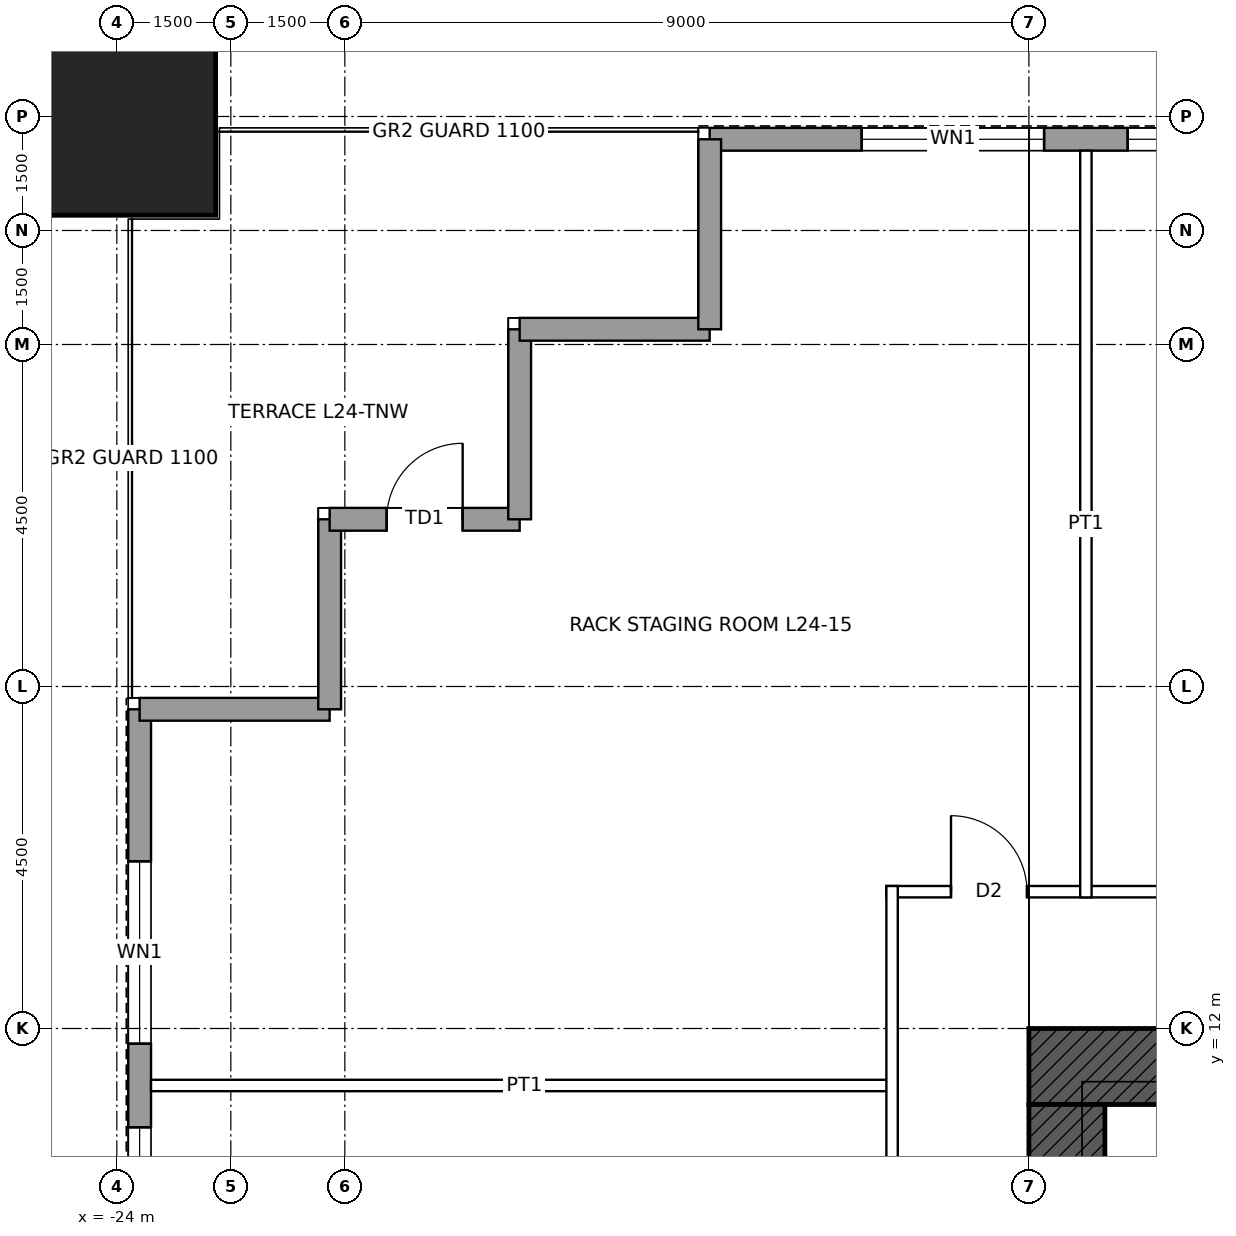
"""IFC4 building model, lengths in metres.
Left out: names, types, materials, properties, quantities, classifications, styles, units other than length and angle.
Written with IfcOpenShell. Run it as: python <this file> out.ifc"""

import sys

from ifc_helpers import new_model, si_unit, direction, frame, frame_2d, origin, origin_2d, place, context, subcontext, project, spatial, rectangle, hollow_rectangle, extrude, element, fill, save


model = new_model("IFC4")
c1 = context("Model", 3, precision=1e-05, world=origin(), true_north=direction((0.0, 1.0)))
c2 = subcontext(c1, "Body", "Model", "MODEL_VIEW")
j1 = project(units=[si_unit("LENGTHUNIT", "METRE"), si_unit("PLANEANGLEUNIT", "RADIAN")], contexts=[c1])
p1 = place(None, origin())
s1 = spatial("IfcSite", under=j1, at=p1, CompositionType="ELEMENT")
p2 = place(p1, origin())
s2 = spatial("IfcBuilding", under=s1, at=p2, CompositionType="ELEMENT")
p3 = place(p2, frame((0.0, 0.0, 122.4)))
s3 = spatial("IfcBuildingStorey", under=s2, at=p3, CompositionType="ELEMENT", Elevation=122.4)
p4 = place(p3, frame((-24.0, 24.0, 0.0), z_axis=(0.0, 0.0, 1.0), x_axis=(1.0, 0.0, 0.0)))
e1 = element("IfcColumn", 1, at=p4, inside=s3, PredefinedType="COLUMN", context=c2, shape_type="SweptSolid", body=[
    extrude(hollow_rectangle(XDim=2.6, YDim=2.6, WallThickness=0.13, at=origin_2d()), origin(), (0.0, 0.0, 1.0), 4.5),
])
p5 = place(p3, frame((-12.0, 11.5, 0.0), z_axis=(0.0, 0.0, 1.0), x_axis=(1.0, 0.0, 0.0)))
e2 = element("IfcWall", 2, at=p5, inside=s3, PredefinedType="SHEAR", context=c2, shape_type="SweptSolid", body=[
    extrude(rectangle(XDim=24.0, YDim=1.0, at=frame_2d((12.0, 0.0))), origin(), (0.0, 0.0, 1.0), 4.5),
])
p6 = place(p5, frame((6.25, 0.0, 0.0)))
e3 = element("IfcOpeningElement", 3, at=p6, cuts=e2, PredefinedType="OPENING", context=c2, shape_type="SweptSolid", body=[
    extrude(rectangle(XDim=1.0, YDim=2.4, at=frame_2d((0.5, 1.2))), frame((0.0, 0.51, 0.0), z_axis=(0.0, -1.0, 0.0), x_axis=(1.0, 0.0, 0.0)), (0.0, 0.0, 1.0), 1.02),
])
p7 = place(p5, frame((16.75, 0.0, 0.0)))
e4 = element("IfcOpeningElement", 4, at=p7, cuts=e2, PredefinedType="OPENING", context=c2, shape_type="SweptSolid", body=[
    extrude(rectangle(XDim=1.0, YDim=2.4, at=frame_2d((0.5, 1.2))), frame((0.0, 0.51, 0.0), z_axis=(0.0, -1.0, 0.0), x_axis=(1.0, 0.0, 0.0)), (0.0, 0.0, 1.0), 1.02),
])
p8 = place(p3, frame((-11.5, -11.0, 0.0), z_axis=(0.0, 0.0, 1.0), x_axis=(0.0, 1.0, 0.0)))
e5 = element("IfcWall", 5, at=p8, inside=s3, PredefinedType="SHEAR", context=c2, shape_type="SweptSolid", body=[
    extrude(rectangle(XDim=22.0, YDim=1.0, at=frame_2d((11.0, 0.0))), origin(), (0.0, 0.0, 1.0), 4.5),
])
p9 = place(p8, frame((10.5, 0.0, 0.0)))
e6 = element("IfcOpeningElement", 6, at=p9, cuts=e5, PredefinedType="OPENING", context=c2, shape_type="SweptSolid", body=[
    extrude(rectangle(XDim=1.0, YDim=2.4, at=frame_2d((0.5, 1.2))), frame((0.0, 0.51, 0.0), z_axis=(0.0, -1.0, 0.0), x_axis=(1.0, 0.0, 0.0)), (0.0, 0.0, 1.0), 1.02),
])
p10 = place(p3, frame((-16.2, 23.7, 0.0), z_axis=(0.0, 0.0, 1.0), x_axis=(1.0, 0.0, 0.0)))
e7 = element("IfcWall", 7, at=p10, inside=s3, PredefinedType="SOLIDWALL", context=c2, shape_type="SweptSolid", body=[
    extrude(rectangle(XDim=32.4, YDim=0.3, at=frame_2d((16.2, 0.0))), origin(), (0.0, 0.0, 1.0), 4.3),
])
p11 = place(p10, frame((2.0, 0.0, 1.0)))
e8 = element("IfcOpeningElement", 8, at=p11, cuts=e7, PredefinedType="OPENING", context=c2, shape_type="SweptSolid", body=[
    extrude(rectangle(XDim=2.4, YDim=1.2, at=frame_2d((1.2, 0.6))), frame((0.0, 0.16, 0.0), z_axis=(0.0, -1.0, 0.0), x_axis=(1.0, 0.0, 0.0)), (0.0, 0.0, 1.0), 0.32),
])
p12 = place(p10, frame((5.5, 0.0, 1.0)))
e9 = element("IfcOpeningElement", 9, at=p12, cuts=e7, PredefinedType="OPENING", context=c2, shape_type="SweptSolid", body=[
    extrude(rectangle(XDim=2.4, YDim=1.2, at=frame_2d((1.2, 0.6))), frame((0.0, 0.16, 0.0), z_axis=(0.0, -1.0, 0.0), x_axis=(1.0, 0.0, 0.0)), (0.0, 0.0, 1.0), 0.32),
])
p13 = place(p10, frame((8.6, 0.0, 1.0)))
e10 = element("IfcOpeningElement", 10, at=p13, cuts=e7, PredefinedType="OPENING", context=c2, shape_type="SweptSolid", body=[
    extrude(rectangle(XDim=2.4, YDim=1.2, at=frame_2d((1.2, 0.6))), frame((0.0, 0.16, 0.0), z_axis=(0.0, -1.0, 0.0), x_axis=(1.0, 0.0, 0.0)), (0.0, 0.0, 1.0), 0.32),
])
p14 = place(p10, frame((13.65, 0.0, 1.0)))
e11 = element("IfcOpeningElement", 11, at=p14, cuts=e7, PredefinedType="OPENING", context=c2, shape_type="SweptSolid", body=[
    extrude(rectangle(XDim=2.4, YDim=1.2, at=frame_2d((1.2, 0.6))), frame((0.0, 0.16, 0.0), z_axis=(0.0, -1.0, 0.0), x_axis=(1.0, 0.0, 0.0)), (0.0, 0.0, 1.0), 0.32),
])
p15 = place(p10, frame((16.35, 0.0, 1.0)))
e12 = element("IfcOpeningElement", 12, at=p15, cuts=e7, PredefinedType="OPENING", context=c2, shape_type="SweptSolid", body=[
    extrude(rectangle(XDim=2.4, YDim=1.2, at=frame_2d((1.2, 0.6))), frame((0.0, 0.16, 0.0), z_axis=(0.0, -1.0, 0.0), x_axis=(1.0, 0.0, 0.0)), (0.0, 0.0, 1.0), 0.32),
])
p16 = place(p10, frame((21.4, 0.0, 1.0)))
e13 = element("IfcOpeningElement", 13, at=p16, cuts=e7, PredefinedType="OPENING", context=c2, shape_type="SweptSolid", body=[
    extrude(rectangle(XDim=2.4, YDim=1.2, at=frame_2d((1.2, 0.6))), frame((0.0, 0.16, 0.0), z_axis=(0.0, -1.0, 0.0), x_axis=(1.0, 0.0, 0.0)), (0.0, 0.0, 1.0), 0.32),
])
p17 = place(p10, frame((24.5, 0.0, 1.0)))
e14 = element("IfcOpeningElement", 14, at=p17, cuts=e7, PredefinedType="OPENING", context=c2, shape_type="SweptSolid", body=[
    extrude(rectangle(XDim=2.4, YDim=1.2, at=frame_2d((1.2, 0.6))), frame((0.0, 0.16, 0.0), z_axis=(0.0, -1.0, 0.0), x_axis=(1.0, 0.0, 0.0)), (0.0, 0.0, 1.0), 0.32),
])
p18 = place(p10, frame((28.0, 0.0, 1.0)))
e15 = element("IfcOpeningElement", 15, at=p18, cuts=e7, PredefinedType="OPENING", context=c2, shape_type="SweptSolid", body=[
    extrude(rectangle(XDim=2.4, YDim=1.2, at=frame_2d((1.2, 0.6))), frame((0.0, 0.16, 0.0), z_axis=(0.0, -1.0, 0.0), x_axis=(1.0, 0.0, 0.0)), (0.0, 0.0, 1.0), 0.32),
])
p19 = place(p3, frame((-23.7, -16.2, 0.0), z_axis=(0.0, 0.0, 1.0), x_axis=(0.0, 1.0, 0.0)))
e16 = element("IfcWall", 16, at=p19, inside=s3, PredefinedType="SOLIDWALL", context=c2, shape_type="SweptSolid", body=[
    extrude(rectangle(XDim=32.4, YDim=0.3, at=frame_2d((16.2, 0.0))), origin(), (0.0, 0.0, 1.0), 4.3),
])
p20 = place(p19, frame((2.0, 0.0, 1.0)))
e17 = element("IfcOpeningElement", 17, at=p20, cuts=e16, PredefinedType="OPENING", context=c2, shape_type="SweptSolid", body=[
    extrude(rectangle(XDim=2.4, YDim=1.2, at=frame_2d((1.2, 0.6))), frame((0.0, 0.16, 0.0), z_axis=(0.0, -1.0, 0.0), x_axis=(1.0, 0.0, 0.0)), (0.0, 0.0, 1.0), 0.32),
])
p21 = place(p19, frame((5.5, 0.0, 1.0)))
e18 = element("IfcOpeningElement", 18, at=p21, cuts=e16, PredefinedType="OPENING", context=c2, shape_type="SweptSolid", body=[
    extrude(rectangle(XDim=2.4, YDim=1.2, at=frame_2d((1.2, 0.6))), frame((0.0, 0.16, 0.0), z_axis=(0.0, -1.0, 0.0), x_axis=(1.0, 0.0, 0.0)), (0.0, 0.0, 1.0), 0.32),
])
p22 = place(p19, frame((8.6, 0.0, 1.0)))
e19 = element("IfcOpeningElement", 19, at=p22, cuts=e16, PredefinedType="OPENING", context=c2, shape_type="SweptSolid", body=[
    extrude(rectangle(XDim=2.4, YDim=1.2, at=frame_2d((1.2, 0.6))), frame((0.0, 0.16, 0.0), z_axis=(0.0, -1.0, 0.0), x_axis=(1.0, 0.0, 0.0)), (0.0, 0.0, 1.0), 0.32),
])
p23 = place(p19, frame((13.65, 0.0, 1.0)))
e20 = element("IfcOpeningElement", 20, at=p23, cuts=e16, PredefinedType="OPENING", context=c2, shape_type="SweptSolid", body=[
    extrude(rectangle(XDim=2.4, YDim=1.2, at=frame_2d((1.2, 0.6))), frame((0.0, 0.16, 0.0), z_axis=(0.0, -1.0, 0.0), x_axis=(1.0, 0.0, 0.0)), (0.0, 0.0, 1.0), 0.32),
])
p24 = place(p19, frame((16.35, 0.0, 1.0)))
e21 = element("IfcOpeningElement", 21, at=p24, cuts=e16, PredefinedType="OPENING", context=c2, shape_type="SweptSolid", body=[
    extrude(rectangle(XDim=2.4, YDim=1.2, at=frame_2d((1.2, 0.6))), frame((0.0, 0.16, 0.0), z_axis=(0.0, -1.0, 0.0), x_axis=(1.0, 0.0, 0.0)), (0.0, 0.0, 1.0), 0.32),
])
p25 = place(p19, frame((21.4, 0.0, 1.0)))
e22 = element("IfcOpeningElement", 22, at=p25, cuts=e16, PredefinedType="OPENING", context=c2, shape_type="SweptSolid", body=[
    extrude(rectangle(XDim=2.4, YDim=1.2, at=frame_2d((1.2, 0.6))), frame((0.0, 0.16, 0.0), z_axis=(0.0, -1.0, 0.0), x_axis=(1.0, 0.0, 0.0)), (0.0, 0.0, 1.0), 0.32),
])
p26 = place(p19, frame((24.5, 0.0, 1.0)))
e23 = element("IfcOpeningElement", 23, at=p26, cuts=e16, PredefinedType="OPENING", context=c2, shape_type="SweptSolid", body=[
    extrude(rectangle(XDim=2.4, YDim=1.2, at=frame_2d((1.2, 0.6))), frame((0.0, 0.16, 0.0), z_axis=(0.0, -1.0, 0.0), x_axis=(1.0, 0.0, 0.0)), (0.0, 0.0, 1.0), 0.32),
])
p27 = place(p19, frame((28.0, 0.0, 1.0)))
e24 = element("IfcOpeningElement", 24, at=p27, cuts=e16, PredefinedType="OPENING", context=c2, shape_type="SweptSolid", body=[
    extrude(rectangle(XDim=2.4, YDim=1.2, at=frame_2d((1.2, 0.6))), frame((0.0, 0.16, 0.0), z_axis=(0.0, -1.0, 0.0), x_axis=(1.0, 0.0, 0.0)), (0.0, 0.0, 1.0), 0.32),
])
for number, where, z_axis, x_axis in (
    (25, (-23.7, 16.2, 0.0), (0.0, 0.0, 1.0), (1.0, 0.0, 0.0)),
    (26, (-21.2, 16.2, 0.0), (0.0, 0.0, 1.0), (0.0, 1.0, 0.0)),
):
    element("IfcWall", number, at=place(p3, frame(where, z_axis=z_axis, x_axis=x_axis)), inside=s3, PredefinedType="SOLIDWALL", context=c2, shape_type="SweptSolid", body=[
        extrude(rectangle(XDim=2.5, YDim=0.3, at=frame_2d((1.25, 0.0))), origin(), (0.0, 0.0, 1.0), 4.3),
    ])
p28 = place(p3, frame((-21.2, 18.7, 0.0), z_axis=(0.0, 0.0, 1.0), x_axis=(1.0, 0.0, 0.0)))
e27 = element("IfcWall", 27, at=p28, inside=s3, PredefinedType="SOLIDWALL", context=c2, shape_type="SweptSolid", body=[
    extrude(rectangle(XDim=2.5, YDim=0.3, at=frame_2d((1.25, 0.0))), origin(), (0.0, 0.0, 1.0), 4.3),
])
p29 = place(p28, frame((0.75, 0.0, 0.0)))
e28 = element("IfcOpeningElement", 28, at=p29, cuts=e27, PredefinedType="OPENING", context=c2, shape_type="SweptSolid", body=[
    extrude(rectangle(XDim=1.0, YDim=2.4, at=frame_2d((0.5, 1.2))), frame((0.0, 0.16, 0.0), z_axis=(0.0, -1.0, 0.0), x_axis=(1.0, 0.0, 0.0)), (0.0, 0.0, 1.0), 0.32),
])
for number, where, z_axis, x_axis in (
    (29, (-18.7, 18.7, 0.0), (0.0, 0.0, 1.0), (0.0, 1.0, 0.0)),
    (30, (-18.7, 21.2, 0.0), (0.0, 0.0, 1.0), (1.0, 0.0, 0.0)),
    (31, (-16.2, 21.2, 0.0), (0.0, 0.0, 1.0), (0.0, 1.0, 0.0)),
):
    element("IfcWall", number, at=place(p3, frame(where, z_axis=z_axis, x_axis=x_axis)), inside=s3, PredefinedType="SOLIDWALL", context=c2, shape_type="SweptSolid", body=[
        extrude(rectangle(XDim=2.5, YDim=0.3, at=frame_2d((1.25, 0.0))), origin(), (0.0, 0.0, 1.0), 4.3),
    ])
p30 = place(p3, frame((-23.55, 11.25, 0.0), z_axis=(0.0, 0.0, 1.0), x_axis=(1.0, 0.0, 0.0)))
e32 = element("IfcWall", 32, at=p30, inside=s3, PredefinedType="PARTITIONING", context=c2, shape_type="SweptSolid", body=[
    extrude(rectangle(XDim=9.825, YDim=0.15, at=frame_2d((4.913, 0.0))), origin(), (0.0, 0.0, 1.0), 3.431),
])
p31 = place(p3, frame((-13.875, 13.8, 0.0), z_axis=(0.0, 0.0, 1.0), x_axis=(1.0, 0.0, 0.0)))
e33 = element("IfcWall", 33, at=p31, inside=s3, PredefinedType="PARTITIONING", context=c2, shape_type="SweptSolid", body=[
    extrude(rectangle(XDim=27.75, YDim=0.15, at=frame_2d((13.875, 0.0))), origin(), (0.0, 0.0, 1.0), 4.3),
])
p32 = place(p31, frame((5.475, 0.0, 0.0)))
e34 = element("IfcOpeningElement", 34, at=p32, cuts=e33, PredefinedType="OPENING", context=c2, shape_type="SweptSolid", body=[
    extrude(rectangle(XDim=1.8, YDim=2.4, at=frame_2d((0.9, 1.2))), frame((0.0, 0.085, 0.0), z_axis=(0.0, -1.0, 0.0), x_axis=(1.0, 0.0, 0.0)), (0.0, 0.0, 1.0), 0.17),
])
p33 = place(p31, frame((13.375, 0.0, 0.0)))
e35 = element("IfcOpeningElement", 35, at=p33, cuts=e33, PredefinedType="OPENING", context=c2, shape_type="SweptSolid", body=[
    extrude(rectangle(XDim=1.0, YDim=2.1, at=frame_2d((0.5, 1.05))), frame((0.0, 0.085, 0.0), z_axis=(0.0, -1.0, 0.0), x_axis=(1.0, 0.0, 0.0)), (0.0, 0.0, 1.0), 0.17),
])
p34 = place(p31, frame((20.475, 0.0, 0.0)))
e36 = element("IfcOpeningElement", 36, at=p34, cuts=e33, PredefinedType="OPENING", context=c2, shape_type="SweptSolid", body=[
    extrude(rectangle(XDim=1.8, YDim=2.4, at=frame_2d((0.9, 1.2))), frame((0.0, 0.085, 0.0), z_axis=(0.0, -1.0, 0.0), x_axis=(1.0, 0.0, 0.0)), (0.0, 0.0, 1.0), 0.17),
])
p35 = place(p31, frame((25.9, 0.0, 0.0)))
e37 = element("IfcOpeningElement", 37, at=p35, cuts=e33, PredefinedType="OPENING", context=c2, shape_type="SweptSolid", body=[
    extrude(rectangle(XDim=1.0, YDim=2.1, at=frame_2d((0.5, 1.05))), frame((0.0, 0.085, 0.0), z_axis=(0.0, -1.0, 0.0), x_axis=(1.0, 0.0, 0.0)), (0.0, 0.0, 1.0), 0.17),
])
p36 = place(p31, frame((0.85, 0.0, 0.0)))
e38 = element("IfcOpeningElement", 38, at=p36, cuts=e33, PredefinedType="OPENING", context=c2, shape_type="SweptSolid", body=[
    extrude(rectangle(XDim=1.0, YDim=2.1, at=frame_2d((0.5, 1.05))), frame((0.0, 0.085, 0.0), z_axis=(0.0, -1.0, 0.0), x_axis=(1.0, 0.0, 0.0)), (0.0, 0.0, 1.0), 0.17),
])
p37 = place(p3, frame((-13.8, -13.875, 0.0), z_axis=(0.0, 0.0, 1.0), x_axis=(0.0, 1.0, 0.0)))
e39 = element("IfcWall", 39, at=p37, inside=s3, PredefinedType="PARTITIONING", context=c2, shape_type="SweptSolid", body=[
    extrude(rectangle(XDim=27.75, YDim=0.15, at=frame_2d((13.875, 0.0))), origin(), (0.0, 0.0, 1.0), 4.3),
])
p38 = place(p37, frame((7.75, 0.0, 0.0)))
e40 = element("IfcOpeningElement", 40, at=p38, cuts=e39, PredefinedType="OPENING", context=c2, shape_type="SweptSolid", body=[
    extrude(rectangle(XDim=1.0, YDim=2.1, at=frame_2d((0.5, 1.05))), frame((0.0, 0.085, 0.0), z_axis=(0.0, -1.0, 0.0), x_axis=(1.0, 0.0, 0.0)), (0.0, 0.0, 1.0), 0.17),
])
p39 = place(p37, frame((18.6, 0.0, 0.0)))
e41 = element("IfcOpeningElement", 41, at=p39, cuts=e39, PredefinedType="OPENING", context=c2, shape_type="SweptSolid", body=[
    extrude(rectangle(XDim=1.8, YDim=2.4, at=frame_2d((0.9, 1.2))), frame((0.0, 0.085, 0.0), z_axis=(0.0, -1.0, 0.0), x_axis=(1.0, 0.0, 0.0)), (0.0, 0.0, 1.0), 0.17),
])
p40 = place(p3, frame((-11.25, 13.725, 0.0), z_axis=(0.0, 0.0, 1.0), x_axis=(0.0, 1.0, 0.0)))
e42 = element("IfcWall", 42, at=p40, inside=s3, PredefinedType="PARTITIONING", context=c2, shape_type="SweptSolid", body=[
    extrude(rectangle(XDim=9.825, YDim=0.15, at=frame_2d((4.913, 0.0))), origin(), (0.0, 0.0, 1.0), 3.431),
])
p41 = place(p11, origin())
e43 = element("IfcWindow", 43, at=p41, inside=s3, PartitioningType="SINGLE_PANEL", PredefinedType="WINDOW", context=c2, shape_type="SweptSolid", body=[
    extrude(rectangle(XDim=2.4, YDim=1.2, at=frame_2d((1.2, 0.6))), frame((0.0, 0.03, 0.0), z_axis=(0.0, -1.0, 0.0), x_axis=(1.0, 0.0, 0.0)), (0.0, 0.0, 1.0), 0.06),
])
fill(e8, e43)
p42 = place(p12, origin())
e44 = element("IfcWindow", 44, at=p42, inside=s3, PartitioningType="SINGLE_PANEL", PredefinedType="WINDOW", context=c2, shape_type="SweptSolid", body=[
    extrude(rectangle(XDim=2.4, YDim=1.2, at=frame_2d((1.2, 0.6))), frame((0.0, 0.03, 0.0), z_axis=(0.0, -1.0, 0.0), x_axis=(1.0, 0.0, 0.0)), (0.0, 0.0, 1.0), 0.06),
])
fill(e9, e44)
p43 = place(p26, origin())
e45 = element("IfcWindow", 45, at=p43, inside=s3, PartitioningType="SINGLE_PANEL", PredefinedType="WINDOW", context=c2, shape_type="SweptSolid", body=[
    extrude(rectangle(XDim=2.4, YDim=1.2, at=frame_2d((1.2, 0.6))), frame((0.0, 0.03, 0.0), z_axis=(0.0, -1.0, 0.0), x_axis=(1.0, 0.0, 0.0)), (0.0, 0.0, 1.0), 0.06),
])
fill(e23, e45)
p44 = place(p27, origin())
e46 = element("IfcWindow", 46, at=p44, inside=s3, PartitioningType="SINGLE_PANEL", PredefinedType="WINDOW", context=c2, shape_type="SweptSolid", body=[
    extrude(rectangle(XDim=2.4, YDim=1.2, at=frame_2d((1.2, 0.6))), frame((0.0, 0.03, 0.0), z_axis=(0.0, -1.0, 0.0), x_axis=(1.0, 0.0, 0.0)), (0.0, 0.0, 1.0), 0.06),
])
fill(e24, e46)
p45 = place(p29, origin())
e47 = element("IfcDoor", 47, at=p45, inside=s3, OperationType="SINGLE_SWING_RIGHT", PredefinedType="DOOR", context=c2, shape_type="SweptSolid", body=[
    extrude(rectangle(XDim=1.0, YDim=2.4, at=frame_2d((0.5, 1.2))), frame((0.0, 0.025, 0.0), z_axis=(0.0, -1.0, 0.0), x_axis=(1.0, 0.0, 0.0)), (0.0, 0.0, 1.0), 0.05),
])
fill(e28, e47)
p46 = place(p36, origin())
e48 = element("IfcDoor", 48, at=p46, inside=s3, OperationType="SINGLE_SWING_LEFT", PredefinedType="DOOR", context=c2, shape_type="SweptSolid", body=[
    extrude(rectangle(XDim=1.0, YDim=2.1, at=frame_2d((0.5, 1.05))), frame((0.0, 0.025, 0.0), z_axis=(0.0, -1.0, 0.0), x_axis=(1.0, 0.0, 0.0)), (0.0, 0.0, 1.0), 0.05),
])
fill(e38, e48)
save(model, sys.argv[1])
